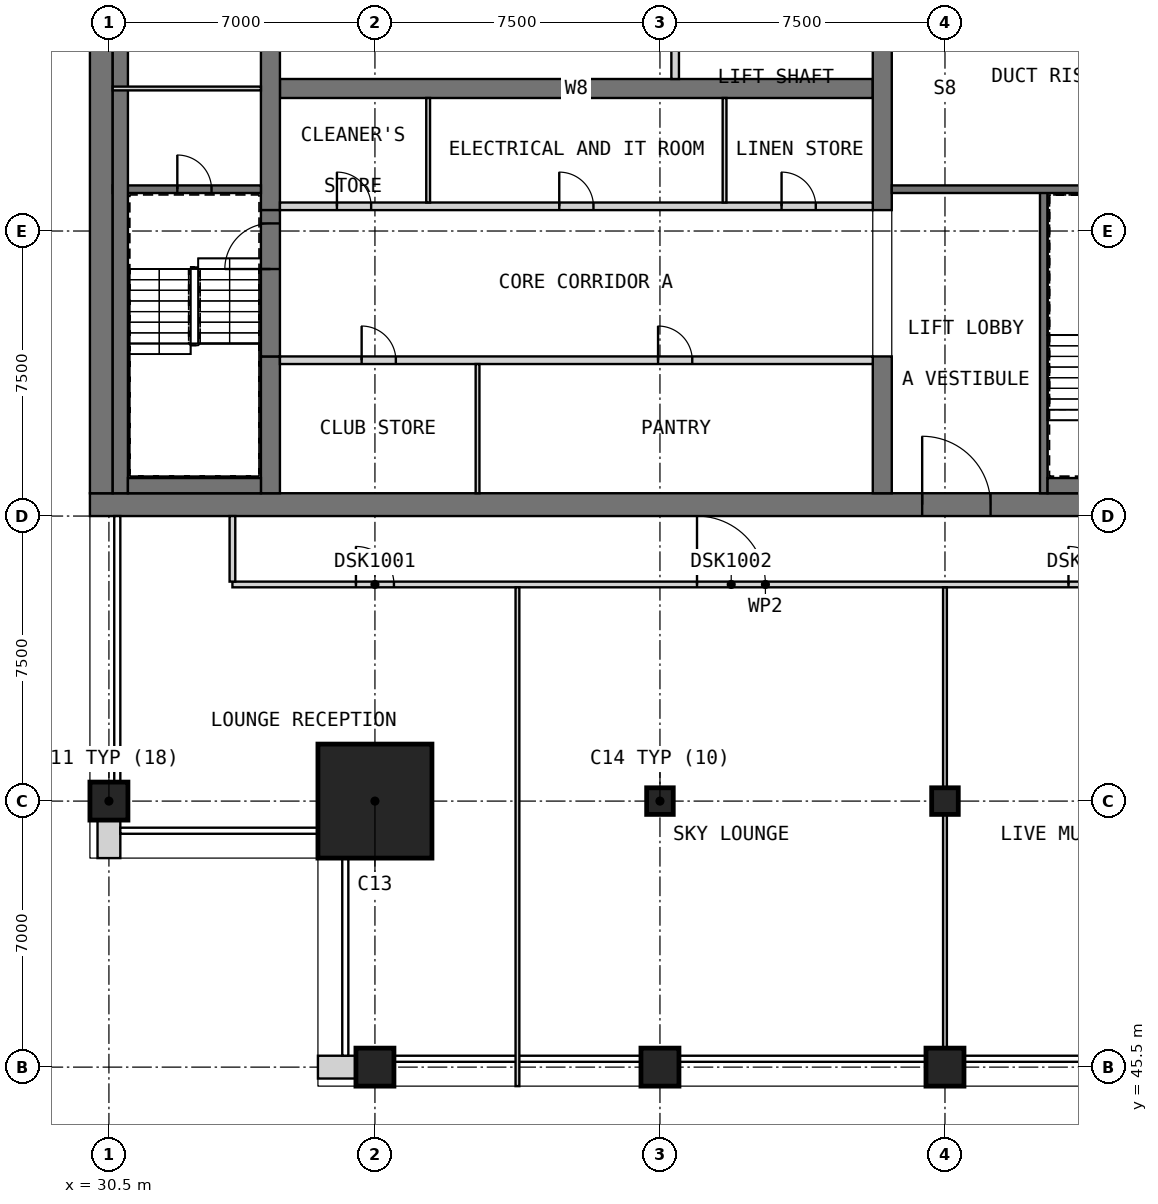
"""IFC4 building model, lengths in metres.
Left out: names, types, materials, properties, quantities, classifications, styles, units other than length and angle.
Written with IfcOpenShell. Run it as: python <this file> out.ifc"""

import sys

from ifc_helpers import new_model, si_unit, direction, frame, frame_2d, origin, origin_2d, place, context, subcontext, project, spatial, rectangle, extrude, element, fill, save


model = new_model("IFC4")
c1 = context("Model", 3, precision=1e-05, world=origin(), true_north=direction((0.0, 1.0)))
c2 = subcontext(c1, "Body", "Model", "MODEL_VIEW")
j1 = project(units=[si_unit("LENGTHUNIT", "METRE"), si_unit("PLANEANGLEUNIT", "RADIAN")], contexts=[c1])
p1 = place(None, origin())
s1 = spatial("IfcSite", under=j1, at=p1, CompositionType="ELEMENT")
p2 = place(p1, origin())
s2 = spatial("IfcBuilding", under=s1, at=p2, CompositionType="ELEMENT")
p3 = place(p2, frame((0.0, 0.0, 297.7)))
s3 = spatial("IfcBuildingStorey", under=s2, at=p3, CompositionType="ELEMENT", Elevation=297.7)
for number, where, z_axis, x_axis in (
    (1, (30.5, 52.5, 0.0), (0.0, 0.0, 1.0), (1.0, 0.0, 0.0)),
    (2, (37.5, 45.5, 0.0), (0.0, 0.0, 1.0), (1.0, 0.0, 0.0)),
    (3, (45.0, 45.5, 0.0), (0.0, 0.0, 1.0), (1.0, 0.0, 0.0)),
):
    element("IfcColumn", number, at=place(p3, frame(where, z_axis=z_axis, x_axis=x_axis)), inside=s3, PredefinedType="COLUMN", context=c2, shape_type="SweptSolid", body=[
        extrude(rectangle(XDim=1.0, YDim=1.0, at=origin_2d()), origin(), (0.0, 0.0, 1.0), 5.0),
    ])
p4 = place(p3, frame((45.0, 52.5, 0.0), z_axis=(0.0, 0.0, 1.0), x_axis=(1.0, 0.0, 0.0)))
e4 = element("IfcColumn", 4, at=p4, inside=s3, PredefinedType="COLUMN", context=c2, shape_type="SweptSolid", body=[
    extrude(rectangle(XDim=0.7, YDim=0.7, at=origin_2d()), origin(), (0.0, 0.0, 1.0), 5.0),
])
p5 = place(p3, frame((52.5, 45.5, 0.0), z_axis=(0.0, 0.0, 1.0), x_axis=(1.0, 0.0, 0.0)))
e5 = element("IfcColumn", 5, at=p5, inside=s3, PredefinedType="COLUMN", context=c2, shape_type="SweptSolid", body=[
    extrude(rectangle(XDim=1.0, YDim=1.0, at=origin_2d()), origin(), (0.0, 0.0, 1.0), 5.0),
])
p6 = place(p3, frame((52.5, 52.5, 0.0), z_axis=(0.0, 0.0, 1.0), x_axis=(1.0, 0.0, 0.0)))
e6 = element("IfcColumn", 6, at=p6, inside=s3, PredefinedType="COLUMN", context=c2, shape_type="SweptSolid", body=[
    extrude(rectangle(XDim=0.7, YDim=0.7, at=origin_2d()), origin(), (0.0, 0.0, 1.0), 5.0),
])
p7 = place(p3, frame((37.5, 52.5, 0.0), z_axis=(0.0, 0.0, 1.0), x_axis=(1.0, 0.0, 0.0)))
e7 = element("IfcColumn", 7, at=p7, inside=s3, PredefinedType="COLUMN", context=c2, shape_type="SweptSolid", body=[
    extrude(rectangle(XDim=3.0, YDim=3.0, at=origin_2d()), origin(), (0.0, 0.0, 1.0), 5.0),
])
p8 = place(p3, frame((30.0, 60.3, 0.0), z_axis=(0.0, 0.0, 1.0), x_axis=(1.0, 0.0, 0.0)))
e8 = element("IfcWall", 8, at=p8, inside=s3, PredefinedType="SHEAR", context=c2, shape_type="SweptSolid", body=[
    extrude(rectangle(XDim=30.0, YDim=0.6, at=frame_2d((15.0, 0.0))), origin(), (0.0, 0.0, 1.0), 5.0),
])
p9 = place(p8, frame((21.9, 0.0, 0.0)))
e9 = element("IfcOpeningElement", 9, at=p9, cuts=e8, PredefinedType="OPENING", context=c2, shape_type="SweptSolid", body=[
    extrude(rectangle(XDim=1.8, YDim=2.1, at=frame_2d((0.9, 1.05))), frame((0.0, 0.31, 0.0), z_axis=(0.0, -1.0, 0.0), x_axis=(1.0, 0.0, 0.0)), (0.0, 0.0, 1.0), 0.62),
])
p10 = place(p8, frame((26.5, 0.0, 0.0)))
e10 = element("IfcOpeningElement", 10, at=p10, cuts=e8, PredefinedType="OPENING", context=c2, shape_type="SweptSolid", body=[
    extrude(rectangle(XDim=1.2, YDim=2.1, at=frame_2d((0.6, 1.05))), frame((0.0, 0.31, 0.0), z_axis=(0.0, -1.0, 0.0), x_axis=(1.0, 0.0, 0.0)), (0.0, 0.0, 1.0), 0.62),
])
p11 = place(p3, frame((30.3, 60.6, 0.0), z_axis=(0.0, 0.0, 1.0), x_axis=(0.0, 1.0, 0.0)))
e11 = element("IfcWall", 11, at=p11, inside=s3, PredefinedType="SHEAR", context=c2, shape_type="SweptSolid", body=[
    extrude(rectangle(XDim=21.3, YDim=0.6, at=frame_2d((10.65, 0.0))), origin(), (0.0, 0.0, 1.0), 5.0),
])
p12 = place(p3, frame((35.0, 71.25, 0.0), z_axis=(0.0, 0.0, 1.0), x_axis=(1.0, 0.0, 0.0)))
e12 = element("IfcWall", 12, at=p12, inside=s3, PredefinedType="SHEAR", context=c2, shape_type="SweptSolid", body=[
    extrude(rectangle(XDim=15.6, YDim=0.5, at=frame_2d((7.8, 0.0))), origin(), (0.0, 0.0, 1.0), 5.0),
])
p13 = place(p3, frame((34.75, 60.6, 0.0), z_axis=(0.0, 0.0, 1.0), x_axis=(0.0, 1.0, 0.0)))
e13 = element("IfcWall", 13, at=p13, inside=s3, PredefinedType="SHEAR", context=c2, shape_type="SweptSolid", body=[
    extrude(rectangle(XDim=3.6, YDim=0.5, at=frame_2d((1.8, 0.0))), origin(), (0.0, 0.0, 1.0), 5.0),
])
p14 = place(p3, frame((34.75, 68.05, 0.0), z_axis=(0.0, 0.0, 1.0), x_axis=(0.0, 1.0, 0.0)))
e14 = element("IfcWall", 14, at=p14, inside=s3, PredefinedType="SHEAR", context=c2, shape_type="SweptSolid", body=[
    extrude(rectangle(XDim=6.4, YDim=0.5, at=frame_2d((3.2, 0.0))), origin(), (0.0, 0.0, 1.0), 5.0),
])
p15 = place(p3, frame((50.85, 60.6, 0.0), z_axis=(0.0, 0.0, 1.0), x_axis=(0.0, 1.0, 0.0)))
e15 = element("IfcWall", 15, at=p15, inside=s3, PredefinedType="SHEAR", context=c2, shape_type="SweptSolid", body=[
    extrude(rectangle(XDim=3.6, YDim=0.5, at=frame_2d((1.8, 0.0))), origin(), (0.0, 0.0, 1.0), 5.0),
])
p16 = place(p3, frame((50.85, 68.05, 0.0), z_axis=(0.0, 0.0, 1.0), x_axis=(0.0, 1.0, 0.0)))
e16 = element("IfcWall", 16, at=p16, inside=s3, PredefinedType="SHEAR", context=c2, shape_type="SweptSolid", body=[
    extrude(rectangle(XDim=6.4, YDim=0.5, at=frame_2d((3.2, 0.0))), origin(), (0.0, 0.0, 1.0), 5.0),
])
p17 = place(p2, frame((0.0, 0.0, 34.0)))
s4 = spatial("IfcBuildingStorey", under=s2, at=p17, CompositionType="ELEMENT", Elevation=34.0)
for number, where, z_axis, x_axis in (
    (17, (29.7, 61.05, 0.0), (0.0, 0.0, 1.0), (0.0, 1.0, 0.0)),
    (18, (29.7, 65.925, 0.0), (0.0, 0.0, 1.0), (0.0, 1.0, 0.0)),
    (19, (29.7, 70.8, 0.0), (0.0, 0.0, 1.0), (0.0, 1.0, 0.0)),
):
    element("IfcWall", number, at=place(p17, frame(where, z_axis=z_axis, x_axis=x_axis)), inside=s4, PredefinedType="SOLIDWALL", context=c2, shape_type="SweptSolid", body=[
        extrude(rectangle(XDim=0.9, YDim=0.6, at=frame_2d((0.45, 0.0))), origin(), (0.0, 0.0, 1.0), 286.2),
    ])
for number, where, z_axis, x_axis in (
    (20, (36.0, 45.5, 0.0), (0.0, 0.0, 1.0), (1.0, 0.0, 0.0)),
    (21, (30.5, 52.0, 0.0), (0.0, 0.0, 1.0), (0.0, -1.0, 0.0)),
):
    element("IfcWall", number, at=place(p3, frame(where, z_axis=z_axis, x_axis=x_axis)), inside=s3, PredefinedType="SOLIDWALL", context=c2, shape_type="SweptSolid", body=[
        extrude(rectangle(XDim=1.0, YDim=0.6, at=frame_2d((0.5, 0.0))), origin(), (0.0, 0.0, 1.0), 4.7),
    ])
p18 = place(p3, frame((35.0, 64.1, 0.0), z_axis=(0.0, 0.0, 1.0), x_axis=(1.0, 0.0, 0.0)))
e22 = element("IfcWall", 22, at=p18, inside=s3, PredefinedType="PARTITIONING", context=c2, shape_type="SweptSolid", body=[
    extrude(rectangle(XDim=15.6, YDim=0.2, at=frame_2d((7.8, 0.0))), origin(), (0.0, 0.0, 1.0), 4.7),
])
p19 = place(p18, frame((2.15, 0.0, 0.0)))
e23 = element("IfcOpeningElement", 23, at=p19, cuts=e22, PredefinedType="OPENING", context=c2, shape_type="SweptSolid", body=[
    extrude(rectangle(XDim=0.9, YDim=2.1, at=frame_2d((0.45, 1.05))), frame((0.0, 0.11, 0.0), z_axis=(0.0, -1.0, 0.0), x_axis=(1.0, 0.0, 0.0)), (0.0, 0.0, 1.0), 0.22),
])
p20 = place(p18, frame((9.95, 0.0, 0.0)))
e24 = element("IfcOpeningElement", 24, at=p20, cuts=e22, PredefinedType="OPENING", context=c2, shape_type="SweptSolid", body=[
    extrude(rectangle(XDim=0.9, YDim=2.1, at=frame_2d((0.45, 1.05))), frame((0.0, 0.11, 0.0), z_axis=(0.0, -1.0, 0.0), x_axis=(1.0, 0.0, 0.0)), (0.0, 0.0, 1.0), 0.22),
])
p21 = place(p3, frame((40.2, 60.6, 0.0), z_axis=(0.0, 0.0, 1.0), x_axis=(0.0, 1.0, 0.0)))
e25 = element("IfcWall", 25, at=p21, inside=s3, PredefinedType="PARTITIONING", context=c2, shape_type="SweptSolid", body=[
    extrude(rectangle(XDim=3.4, YDim=0.1, at=frame_2d((1.7, 0.0))), origin(), (0.0, 0.0, 1.0), 4.7),
])
p22 = place(p3, frame((35.0, 68.15, 0.0), z_axis=(0.0, 0.0, 1.0), x_axis=(1.0, 0.0, 0.0)))
e26 = element("IfcWall", 26, at=p22, inside=s3, PredefinedType="PARTITIONING", context=c2, shape_type="SweptSolid", body=[
    extrude(rectangle(XDim=15.6, YDim=0.2, at=frame_2d((7.8, 0.0))), origin(), (0.0, 0.0, 1.0), 4.7),
])
p23 = place(p22, frame((1.5, 0.0, 0.0)))
e27 = element("IfcOpeningElement", 27, at=p23, cuts=e26, PredefinedType="OPENING", context=c2, shape_type="SweptSolid", body=[
    extrude(rectangle(XDim=0.9, YDim=2.1, at=frame_2d((0.45, 1.05))), frame((0.0, 0.11, 0.0), z_axis=(0.0, -1.0, 0.0), x_axis=(1.0, 0.0, 0.0)), (0.0, 0.0, 1.0), 0.22),
])
p24 = place(p22, frame((7.35, 0.0, 0.0)))
e28 = element("IfcOpeningElement", 28, at=p24, cuts=e26, PredefinedType="OPENING", context=c2, shape_type="SweptSolid", body=[
    extrude(rectangle(XDim=0.9, YDim=2.1, at=frame_2d((0.45, 1.05))), frame((0.0, 0.11, 0.0), z_axis=(0.0, -1.0, 0.0), x_axis=(1.0, 0.0, 0.0)), (0.0, 0.0, 1.0), 0.22),
])
p25 = place(p22, frame((13.2, 0.0, 0.0)))
e29 = element("IfcOpeningElement", 29, at=p25, cuts=e26, PredefinedType="OPENING", context=c2, shape_type="SweptSolid", body=[
    extrude(rectangle(XDim=0.9, YDim=2.1, at=frame_2d((0.45, 1.05))), frame((0.0, 0.11, 0.0), z_axis=(0.0, -1.0, 0.0), x_axis=(1.0, 0.0, 0.0)), (0.0, 0.0, 1.0), 0.22),
])
for number, where, z_axis, x_axis in (
    (30, (38.9, 68.25, 0.0), (0.0, 0.0, 1.0), (0.0, 1.0, 0.0)),
    (31, (46.7, 68.25, 0.0), (0.0, 0.0, 1.0), (0.0, 1.0, 0.0)),
):
    element("IfcWall", number, at=place(p3, frame(where, z_axis=z_axis, x_axis=x_axis)), inside=s3, PredefinedType="PARTITIONING", context=c2, shape_type="SweptSolid", body=[
        extrude(rectangle(XDim=2.75, YDim=0.1, at=frame_2d((1.375, 0.0))), origin(), (0.0, 0.0, 1.0), 4.7),
    ])
p26 = place(p3, frame((45.4, 71.5, 0.0), z_axis=(0.0, 0.0, 1.0), x_axis=(0.0, 1.0, 0.0)))
e32 = element("IfcWall", 32, at=p26, inside=s3, PredefinedType="SOLIDWALL", context=c2, shape_type="SweptSolid", body=[
    extrude(rectangle(XDim=2.0, YDim=0.2, at=frame_2d((1.0, 0.0))), origin(), (0.0, 0.0, 1.0), 5.0),
])
p27 = place(p3, frame((34.75, 64.2, 0.0), z_axis=(0.0, 0.0, 1.0), x_axis=(0.0, 1.0, 0.0)))
e33 = element("IfcWall", 33, at=p27, inside=s3, PredefinedType="SOLIDWALL", context=c2, shape_type="SweptSolid", body=[
    extrude(rectangle(XDim=3.85, YDim=0.5, at=frame_2d((1.925, 0.0))), origin(), (0.0, 0.0, 1.0), 3.8),
])
p28 = place(p27, frame((2.3, 0.0, 0.0)))
e34 = element("IfcOpeningElement", 34, at=p28, cuts=e33, PredefinedType="OPENING", context=c2, shape_type="SweptSolid", body=[
    extrude(rectangle(XDim=1.2, YDim=2.1, at=frame_2d((0.6, 1.05))), frame((0.0, 0.26, 0.0), z_axis=(0.0, -1.0, 0.0), x_axis=(1.0, 0.0, 0.0)), (0.0, 0.0, 1.0), 0.52),
])
p29 = place(p3, frame((30.6, 68.6, 0.0), z_axis=(0.0, 0.0, 1.0), x_axis=(1.0, 0.0, 0.0)))
e35 = element("IfcWall", 35, at=p29, inside=s3, PredefinedType="SOLIDWALL", context=c2, shape_type="SweptSolid", body=[
    extrude(rectangle(XDim=3.9, YDim=0.2, at=frame_2d((1.95, 0.0))), origin(), (0.0, 0.0, 1.0), 4.7),
])
p30 = place(p29, frame((1.7, 0.0, 0.0)))
e36 = element("IfcOpeningElement", 36, at=p30, cuts=e35, PredefinedType="OPENING", context=c2, shape_type="SweptSolid", body=[
    extrude(rectangle(XDim=0.9, YDim=2.1, at=frame_2d((0.45, 1.05))), frame((0.0, 0.11, 0.0), z_axis=(0.0, -1.0, 0.0), x_axis=(1.0, 0.0, 0.0)), (0.0, 0.0, 1.0), 0.22),
])
p31 = place(p3, frame((55.1, 60.6, 0.0), z_axis=(0.0, 0.0, 1.0), x_axis=(0.0, 1.0, 0.0)))
e37 = element("IfcWall", 37, at=p31, inside=s3, PredefinedType="SOLIDWALL", context=c2, shape_type="SweptSolid", body=[
    extrude(rectangle(XDim=8.0, YDim=0.2, at=frame_2d((4.0, 0.0))), origin(), (0.0, 0.0, 1.0), 4.7),
])
p32 = place(p3, frame((51.1, 68.6, 0.0), z_axis=(0.0, 0.0, 1.0), x_axis=(1.0, 0.0, 0.0)))
e38 = element("IfcWall", 38, at=p32, inside=s3, PredefinedType="SOLIDWALL", context=c2, shape_type="SweptSolid", body=[
    extrude(rectangle(XDim=8.3, YDim=0.2, at=frame_2d((4.15, 0.0))), origin(), (0.0, 0.0, 1.0), 4.7),
])
p33 = place(p3, frame((30.8, 60.6, 0.0), z_axis=(0.0, 0.0, 1.0), x_axis=(0.0, 1.0, 0.0)))
e39 = element("IfcWall", 39, at=p33, inside=s3, PredefinedType="SOLIDWALL", context=c2, shape_type="SweptSolid", body=[
    extrude(rectangle(XDim=21.3, YDim=0.4, at=frame_2d((10.65, 0.0))), origin(), (0.0, 0.0, 1.0), 4.7),
])
p34 = place(p3, frame((31.0, 60.8, 0.0), z_axis=(0.0, 0.0, 1.0), x_axis=(1.0, 0.0, 0.0)))
e40 = element("IfcWall", 40, at=p34, inside=s3, PredefinedType="SOLIDWALL", context=c2, shape_type="SweptSolid", body=[
    extrude(rectangle(XDim=3.5, YDim=0.4, at=frame_2d((1.75, 0.0))), origin(), (0.0, 0.0, 1.0), 4.7),
])
p35 = place(p3, frame((55.2, 60.8, 0.0), z_axis=(0.0, 0.0, 1.0), x_axis=(1.0, 0.0, 0.0)))
e41 = element("IfcWall", 41, at=p35, inside=s3, PredefinedType="SOLIDWALL", context=c2, shape_type="SweptSolid", body=[
    extrude(rectangle(XDim=1.3, YDim=0.4, at=frame_2d((0.65, 0.0))), origin(), (0.0, 0.0, 1.0), 4.7),
])
p36 = place(p3, frame((30.6, 71.25, 0.0), z_axis=(0.0, 0.0, 1.0), x_axis=(1.0, 0.0, 0.0)))
e42 = element("IfcWall", 42, at=p36, inside=s3, PredefinedType="PARTITIONING", context=c2, shape_type="SweptSolid", body=[
    extrude(rectangle(XDim=3.9, YDim=0.1, at=frame_2d((1.95, 0.0))), origin(), (0.0, 0.0, 1.0), 4.7),
])
p37 = place(p3, frame((33.75, 58.2, 0.0), z_axis=(0.0, 0.0, 1.0), x_axis=(1.0, 0.0, 0.0)))
e43 = element("IfcWall", 43, at=p37, inside=s3, PredefinedType="PARTITIONING", context=c2, shape_type="SweptSolid", body=[
    extrude(rectangle(XDim=28.05, YDim=0.15, at=frame_2d((14.025, 0.0))), origin(), (0.0, 0.0, 1.0), 4.7),
])
p38 = place(p37, frame((3.25, 0.0, 0.0)))
e44 = element("IfcOpeningElement", 44, at=p38, cuts=e43, PredefinedType="OPENING", context=c2, shape_type="SweptSolid", body=[
    extrude(rectangle(XDim=1.0, YDim=2.1, at=frame_2d((0.5, 1.05))), frame((0.0, 0.085, 0.0), z_axis=(0.0, -1.0, 0.0), x_axis=(1.0, 0.0, 0.0)), (0.0, 0.0, 1.0), 0.17),
])
p39 = place(p37, frame((12.225, 0.0, 0.0)))
e45 = element("IfcOpeningElement", 45, at=p39, cuts=e43, PredefinedType="OPENING", context=c2, shape_type="SweptSolid", body=[
    extrude(rectangle(XDim=1.8, YDim=2.1, at=frame_2d((0.9, 1.05))), frame((0.0, 0.085, 0.0), z_axis=(0.0, -1.0, 0.0), x_axis=(1.0, 0.0, 0.0)), (0.0, 0.0, 1.0), 0.17),
])
p40 = place(p37, frame((22.0, 0.0, 0.0)))
e46 = element("IfcOpeningElement", 46, at=p40, cuts=e43, PredefinedType="OPENING", context=c2, shape_type="SweptSolid", body=[
    extrude(rectangle(XDim=1.0, YDim=2.1, at=frame_2d((0.5, 1.05))), frame((0.0, 0.085, 0.0), z_axis=(0.0, -1.0, 0.0), x_axis=(1.0, 0.0, 0.0)), (0.0, 0.0, 1.0), 0.17),
])
p41 = place(p37, frame((26.65, 0.0, 0.0)))
e47 = element("IfcOpeningElement", 47, at=p41, cuts=e43, PredefinedType="OPENING", context=c2, shape_type="SweptSolid", body=[
    extrude(rectangle(XDim=1.0, YDim=2.1, at=frame_2d((0.5, 1.05))), frame((0.0, 0.085, 0.0), z_axis=(0.0, -1.0, 0.0), x_axis=(1.0, 0.0, 0.0)), (0.0, 0.0, 1.0), 0.17),
])
p42 = place(p3, frame((33.75, 58.275, 0.0), z_axis=(0.0, 0.0, 1.0), x_axis=(0.0, 1.0, 0.0)))
e48 = element("IfcWall", 48, at=p42, inside=s3, PredefinedType="PARTITIONING", context=c2, shape_type="SweptSolid", body=[
    extrude(rectangle(XDim=1.725, YDim=0.15, at=frame_2d((0.863, 0.0))), origin(), (0.0, 0.0, 1.0), 4.7),
])
for number, where, z_axis, x_axis in (
    (49, (41.25, 45.0, 0.0), (0.0, 0.0, 1.0), (0.0, 1.0, 0.0)),
    (50, (52.5, 45.0, 0.0), (0.0, 0.0, 1.0), (0.0, 1.0, 0.0)),
):
    element("IfcWall", number, at=place(p3, frame(where, z_axis=z_axis, x_axis=x_axis)), inside=s3, PredefinedType="PARTITIONING", context=c2, shape_type="SweptSolid", body=[
        extrude(rectangle(XDim=13.125, YDim=0.1, at=frame_2d((6.562, 0.0))), origin(), (0.0, 0.0, 1.0), 4.7),
    ])
p43 = place(p19, origin())
e51 = element("IfcDoor", 51, at=p43, inside=s3, OperationType="SINGLE_SWING_RIGHT", PredefinedType="DOOR", context=c2, shape_type="SweptSolid", body=[
    extrude(rectangle(XDim=0.9, YDim=2.1, at=frame_2d((0.45, 1.05))), frame((0.0, 0.025, 0.0), z_axis=(0.0, -1.0, 0.0), x_axis=(1.0, 0.0, 0.0)), (0.0, 0.0, 1.0), 0.05),
])
fill(e23, e51)
p44 = place(p20, origin())
e52 = element("IfcDoor", 52, at=p44, inside=s3, OperationType="SINGLE_SWING_LEFT", PredefinedType="DOOR", context=c2, shape_type="SweptSolid", body=[
    extrude(rectangle(XDim=0.9, YDim=2.1, at=frame_2d((0.45, 1.05))), frame((0.0, 0.025, 0.0), z_axis=(0.0, -1.0, 0.0), x_axis=(1.0, 0.0, 0.0)), (0.0, 0.0, 1.0), 0.05),
])
fill(e24, e52)
p45 = place(p23, origin())
e53 = element("IfcDoor", 53, at=p45, inside=s3, OperationType="SINGLE_SWING_RIGHT", PredefinedType="DOOR", context=c2, shape_type="SweptSolid", body=[
    extrude(rectangle(XDim=0.9, YDim=2.1, at=frame_2d((0.45, 1.05))), frame((0.0, 0.025, 0.0), z_axis=(0.0, -1.0, 0.0), x_axis=(1.0, 0.0, 0.0)), (0.0, 0.0, 1.0), 0.05),
])
fill(e27, e53)
p46 = place(p24, origin())
e54 = element("IfcDoor", 54, at=p46, inside=s3, OperationType="SINGLE_SWING_LEFT", PredefinedType="DOOR", context=c2, shape_type="SweptSolid", body=[
    extrude(rectangle(XDim=0.9, YDim=2.1, at=frame_2d((0.45, 1.05))), frame((0.0, 0.025, 0.0), z_axis=(0.0, -1.0, 0.0), x_axis=(1.0, 0.0, 0.0)), (0.0, 0.0, 1.0), 0.05),
])
fill(e28, e54)
p47 = place(p25, origin())
e55 = element("IfcDoor", 55, at=p47, inside=s3, OperationType="SINGLE_SWING_RIGHT", PredefinedType="DOOR", context=c2, shape_type="SweptSolid", body=[
    extrude(rectangle(XDim=0.9, YDim=2.1, at=frame_2d((0.45, 1.05))), frame((0.0, 0.025, 0.0), z_axis=(0.0, -1.0, 0.0), x_axis=(1.0, 0.0, 0.0)), (0.0, 0.0, 1.0), 0.05),
])
fill(e29, e55)
p48 = place(p9, origin())
e56 = element("IfcDoor", 56, at=p48, inside=s3, OperationType="DOUBLE_DOOR_SINGLE_SWING", PredefinedType="DOOR", context=c2, shape_type="SweptSolid", body=[
    extrude(rectangle(XDim=1.8, YDim=2.1, at=frame_2d((0.9, 1.05))), frame((0.0, 0.025, 0.0), z_axis=(0.0, -1.0, 0.0), x_axis=(1.0, 0.0, 0.0)), (0.0, 0.0, 1.0), 0.05),
])
fill(e9, e56)
p49 = place(p28, origin())
e57 = element("IfcDoor", 57, at=p49, inside=s3, OperationType="SINGLE_SWING_LEFT", PredefinedType="DOOR", context=c2, shape_type="SweptSolid", body=[
    extrude(rectangle(XDim=1.2, YDim=2.1, at=frame_2d((0.6, 1.05))), frame((0.0, 0.025, 0.0), z_axis=(0.0, -1.0, 0.0), x_axis=(1.0, 0.0, 0.0)), (0.0, 0.0, 1.0), 0.05),
])
fill(e34, e57)
p50 = place(p30, origin())
e58 = element("IfcDoor", 58, at=p50, inside=s3, OperationType="SINGLE_SWING_LEFT", PredefinedType="DOOR", context=c2, shape_type="SweptSolid", body=[
    extrude(rectangle(XDim=0.9, YDim=2.1, at=frame_2d((0.45, 1.05))), frame((0.0, 0.025, 0.0), z_axis=(0.0, -1.0, 0.0), x_axis=(1.0, 0.0, 0.0)), (0.0, 0.0, 1.0), 0.05),
])
fill(e36, e58)
p51 = place(p38, origin())
e59 = element("IfcDoor", 59, at=p51, inside=s3, OperationType="SINGLE_SWING_RIGHT", PredefinedType="DOOR", context=c2, shape_type="SweptSolid", body=[
    extrude(rectangle(XDim=1.0, YDim=2.1, at=frame_2d((0.5, 1.05))), frame((0.0, 0.025, 0.0), z_axis=(0.0, -1.0, 0.0), x_axis=(1.0, 0.0, 0.0)), (0.0, 0.0, 1.0), 0.05),
])
fill(e44, e59)
p52 = place(p39, origin())
e60 = element("IfcDoor", 60, at=p52, inside=s3, OperationType="DOUBLE_DOOR_SINGLE_SWING", PredefinedType="DOOR", context=c2, shape_type="SweptSolid", body=[
    extrude(rectangle(XDim=1.8, YDim=2.1, at=frame_2d((0.9, 1.05))), frame((0.0, 0.025, 0.0), z_axis=(0.0, -1.0, 0.0), x_axis=(1.0, 0.0, 0.0)), (0.0, 0.0, 1.0), 0.05),
])
fill(e45, e60)
p53 = place(p40, origin())
e61 = element("IfcDoor", 61, at=p53, inside=s3, OperationType="SINGLE_SWING_RIGHT", PredefinedType="DOOR", context=c2, shape_type="SweptSolid", body=[
    extrude(rectangle(XDim=1.0, YDim=2.1, at=frame_2d((0.5, 1.05))), frame((0.0, 0.025, 0.0), z_axis=(0.0, -1.0, 0.0), x_axis=(1.0, 0.0, 0.0)), (0.0, 0.0, 1.0), 0.05),
])
fill(e46, e61)
save(model, sys.argv[1])
